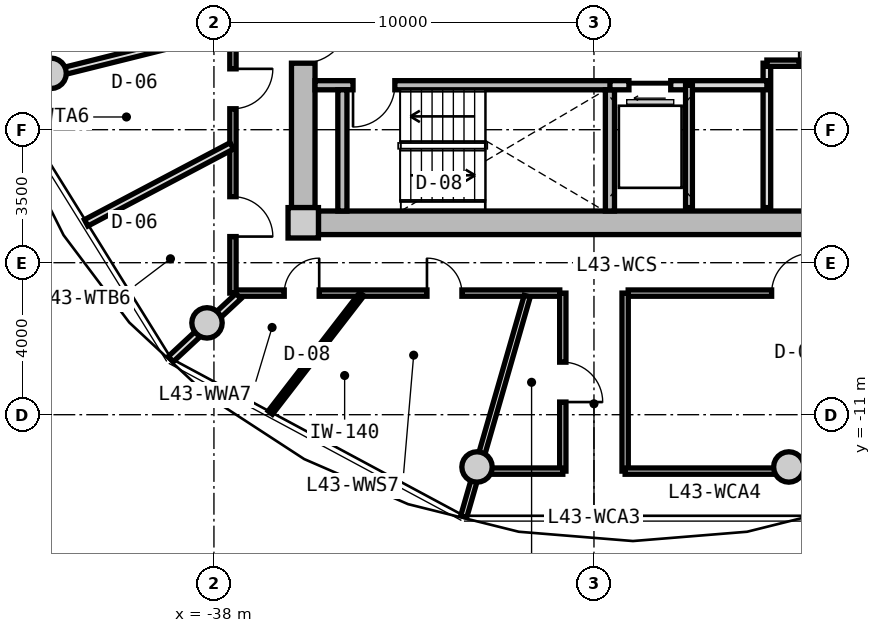
"""IFC4 building model, lengths in metres.
Left out: names, types, materials, properties, quantities, classifications, styles, units other than length and angle.
Written with IfcOpenShell. Run it as: python <this file> out.ifc"""

import sys

from ifc_helpers import new_model, si_unit, direction, frame, frame_2d, origin, origin_2d, place, context, subcontext, project, spatial, rectangle, circle, extrude, source, transform, mapped, element, fill, save


model = new_model("IFC4")
c1 = context("Model", 3, precision=1e-05, world=origin(), true_north=direction((0.0, 1.0)))
c2 = subcontext(c1, "Body", "Model", "MODEL_VIEW")
j1 = project(units=[si_unit("LENGTHUNIT", "METRE"), si_unit("PLANEANGLEUNIT", "RADIAN")], contexts=[c1])
p1 = place(None, origin())
s1 = spatial("IfcSite", under=j1, at=p1, CompositionType="ELEMENT")
p2 = place(p1, origin())
s2 = spatial("IfcBuilding", under=s1, at=p2, CompositionType="ELEMENT")
p3 = place(p2, frame((0.0, 0.0, 140.4)))
s3 = spatial("IfcBuildingStorey", under=s2, at=p3, CompositionType="ELEMENT", Elevation=140.4)
m1 = source(origin(), c2, "Body", "SweptSolid", [
    extrude(rectangle(XDim=0.8, YDim=0.8, at=origin_2d()), origin(), (0.0, 0.0, 1.0), 3.05),
])
p4 = place(p3, frame((-35.65, -5.95, 0.0), z_axis=(0.0, 0.0, 1.0), x_axis=(1.0, 0.0, 0.0)))
e1 = element("IfcColumn", 1, at=p4, inside=s3, PredefinedType="COLUMN", context=c2, shape_type="MappedRepresentation", body=[
    mapped(m1, transform((0.0, 0.0, 0.0), x_axis=(1.0, 0.0, 0.0), y_axis=(0.0, 1.0, 0.0), z_axis=(0.0, 0.0, 1.0), scale=1.0)),
])
m2 = source(origin(), c2, "Body", "SweptSolid", [
    extrude(rectangle(XDim=14.5, YDim=0.62, at=frame_2d((7.25, 0.0))), origin(), (0.0, 0.0, 1.0), 2.81),
])
p5 = place(p3, frame((-20.75, -5.95, 0.0), z_axis=(0.0, 0.0, 1.0), x_axis=(-1.0, 0.0, 0.0)))
e2 = element("IfcWall", 2, at=p5, inside=s3, PredefinedType="SHEAR", context=c2, shape_type="MappedRepresentation", body=[
    mapped(m2, transform((0.0, 0.0, 0.0), x_axis=(1.0, 0.0, 0.0), y_axis=(0.0, 1.0, 0.0), z_axis=(0.0, 0.0, 1.0), scale=1.0)),
])
m3 = source(origin(), c2, "Body", "SweptSolid", [
    extrude(rectangle(XDim=11.1, YDim=0.62, at=frame_2d((5.55, 0.0))), origin(), (0.0, 0.0, 1.0), 2.81),
])
p6 = place(p3, frame((-35.65, -5.55, 0.0), z_axis=(0.0, 0.0, 1.0), x_axis=(0.0, 1.0, 0.0)))
e3 = element("IfcWall", 3, at=p6, inside=s3, PredefinedType="SHEAR", context=c2, shape_type="MappedRepresentation", body=[
    mapped(m3, transform((0.0, 0.0, 0.0), x_axis=(1.0, 0.0, 0.0), y_axis=(0.0, 1.0, 0.0), z_axis=(0.0, 0.0, 1.0), scale=1.0)),
])
p7 = place(p6, frame((3.8, 0.0, 0.0)))
e4 = element("IfcOpeningElement", 4, at=p7, cuts=e3, PredefinedType="OPENING", context=c2, shape_type="SweptSolid", body=[
    extrude(rectangle(XDim=1.2, YDim=2.15, at=frame_2d((0.6, 1.075))), frame((0.0, 0.32, 0.0), z_axis=(0.0, -1.0, 0.0), x_axis=(1.0, 0.0, 0.0)), (0.0, 0.0, 1.0), 0.64),
])
m4 = source(origin(), c2, "Body", "SweptSolid", [
    extrude(circle(Radius=0.4, at=origin_2d()), origin(), (0.0, 0.0, 1.0), 3.05),
])
for number, where, z_axis, x_axis in (
    (5, (-42.285, -2.016, 0.0), (0.0, 0.0, 1.0), (1.0, 0.0, 0.0)),
    (6, (-38.183, -8.584, 0.0), (0.0, 0.0, 1.0), (1.0, 0.0, 0.0)),
    (7, (-31.077, -12.375, 0.0), (0.0, 0.0, 1.0), (1.0, 0.0, 0.0)),
    (8, (-22.873, -12.375, 0.0), (0.0, 0.0, 1.0), (1.0, 0.0, 0.0)),
):
    element("IfcColumn", number, at=place(p3, frame(where, z_axis=z_axis, x_axis=x_axis)), inside=s3, PredefinedType="COLUMN", context=c2, shape_type="MappedRepresentation", body=[
        mapped(m4, transform((0.0, 0.0, 0.0), x_axis=(1.0, 0.0, 0.0), y_axis=(0.0, 1.0, 0.0), z_axis=(0.0, 0.0, 1.0), scale=1.0)),
    ])
m5 = source(origin(), c2, "Body", "SweptSolid", [
    extrude(rectangle(XDim=7.88, YDim=0.24, at=frame_2d((3.94, 0.0))), origin(), (0.0, 0.0, 1.0), 2.81),
])
p8 = place(p3, frame((-35.34, -2.33, 0.0), z_axis=(0.0, 0.0, 1.0), x_axis=(1.0, 0.0, 0.0)))
e9 = element("IfcWall", 9, at=p8, inside=s3, PredefinedType="PARTITIONING", context=c2, shape_type="MappedRepresentation", body=[
    mapped(m5, transform((0.0, 0.0, 0.0), x_axis=(1.0, 0.0, 0.0), y_axis=(0.0, 1.0, 0.0), z_axis=(0.0, 0.0, 1.0), scale=1.0)),
])
p9 = place(p8, frame((1.0, 0.0, 0.0)))
e10 = element("IfcOpeningElement", 10, at=p9, cuts=e9, PredefinedType="OPENING", context=c2, shape_type="SweptSolid", body=[
    extrude(rectangle(XDim=1.1, YDim=2.15, at=frame_2d((0.55, 1.075))), frame((0.0, 0.13, 0.0), z_axis=(0.0, -1.0, 0.0), x_axis=(1.0, 0.0, 0.0)), (0.0, 0.0, 1.0), 0.26),
])
m6 = source(origin(), c2, "Body", "SweptSolid", [
    extrude(rectangle(XDim=3.19, YDim=0.24, at=frame_2d((1.595, 0.0))), origin(), (0.0, 0.0, 1.0), 2.81),
])
for number, where, z_axis, x_axis in (
    (11, (-34.62, -5.64, 0.0), (0.0, 0.0, 1.0), (0.0, 1.0, 0.0)),
    (12, (-27.58, -5.64, 0.0), (0.0, 0.0, 1.0), (0.0, 1.0, 0.0)),
):
    element("IfcWall", number, at=place(p3, frame(where, z_axis=z_axis, x_axis=x_axis)), inside=s3, PredefinedType="PARTITIONING", context=c2, shape_type="MappedRepresentation", body=[
        mapped(m6, transform((0.0, 0.0, 0.0), x_axis=(1.0, 0.0, 0.0), y_axis=(0.0, 1.0, 0.0), z_axis=(0.0, 0.0, 1.0), scale=1.0)),
    ])
m7 = source(origin(), c2, "Body", "SweptSolid", [
    extrude(rectangle(XDim=3.8, YDim=0.2, at=frame_2d((1.9, 0.0))), origin(), (0.0, 0.0, 1.0), 2.795),
])
p10 = place(p3, frame((-23.45, -5.55, 0.0), z_axis=(0.0, 0.0, 1.0), x_axis=(0.0, 1.0, 0.0)))
e13 = element("IfcWall", 13, at=p10, inside=s3, PredefinedType="PARTITIONING", context=c2, shape_type="MappedRepresentation", body=[
    mapped(m7, transform((0.0, 0.0, 0.0), x_axis=(1.0, 0.0, 0.0), y_axis=(0.0, 1.0, 0.0), z_axis=(0.0, 0.0, 1.0), scale=1.0)),
])
m8 = source(origin(), c2, "Body", "SweptSolid", [
    extrude(rectangle(XDim=4.13, YDim=0.24, at=frame_2d((2.065, 0.0))), origin(), (0.0, 0.0, 1.0), 2.795),
])
p11 = place(p3, frame((-27.58, -2.33, 0.0), z_axis=(0.0, 0.0, 1.0), x_axis=(1.0, 0.0, 0.0)))
e14 = element("IfcWall", 14, at=p11, inside=s3, PredefinedType="PARTITIONING", context=c2, shape_type="MappedRepresentation", body=[
    mapped(m8, transform((0.0, 0.0, 0.0), x_axis=(1.0, 0.0, 0.0), y_axis=(0.0, 1.0, 0.0), z_axis=(0.0, 0.0, 1.0), scale=1.0)),
])
p12 = place(p11, frame((0.5, 0.0, 0.0)))
e15 = element("IfcOpeningElement", 15, at=p12, cuts=e14, PredefinedType="OPENING", context=c2, shape_type="SweptSolid", body=[
    extrude(rectangle(XDim=1.1, YDim=2.2, at=frame_2d((0.55, 1.1))), frame((0.0, 0.13, 0.0), z_axis=(0.0, -1.0, 0.0), x_axis=(1.0, 0.0, 0.0)), (0.0, 0.0, 1.0), 0.26),
])
m9 = source(origin(), c2, "Body", "SweptSolid", [
    extrude(rectangle(XDim=3.22, YDim=0.18, at=frame_2d((1.61, 0.0))), origin(), (0.0, 0.0, 1.0), 2.795),
])
p13 = place(p3, frame((-25.5, -5.55, 0.0), z_axis=(0.0, 0.0, 1.0), x_axis=(0.0, 1.0, 0.0)))
e16 = element("IfcWall", 16, at=p13, inside=s3, PredefinedType="PARTITIONING", context=c2, shape_type="MappedRepresentation", body=[
    mapped(m9, transform((0.0, 0.0, 0.0), x_axis=(1.0, 0.0, 0.0), y_axis=(0.0, 1.0, 0.0), z_axis=(0.0, 0.0, 1.0), scale=1.0)),
])
m10 = source(origin(), c2, "Body", "SweptSolid", [
    extrude(rectangle(XDim=2.7, YDim=0.165, at=frame_2d((1.35, 0.0))), origin(), (0.0, 0.0, 1.0), 2.795),
])
p14 = place(p3, frame((-23.45, -1.75, 0.0), z_axis=(0.0, 0.0, 1.0), x_axis=(1.0, 0.0, 0.0)))
e17 = element("IfcWall", 17, at=p14, inside=s3, PredefinedType="PARTITIONING", context=c2, shape_type="MappedRepresentation", body=[
    mapped(m10, transform((0.0, 0.0, 0.0), x_axis=(1.0, 0.0, 0.0), y_axis=(0.0, 1.0, 0.0), z_axis=(0.0, 0.0, 1.0), scale=1.0)),
])
p15 = place(p14, frame((0.85, 0.0, 0.0)))
e18 = element("IfcOpeningElement", 18, at=p15, cuts=e17, PredefinedType="OPENING", context=c2, shape_type="SweptSolid", body=[
    extrude(rectangle(XDim=0.925, YDim=2.1, at=frame_2d((0.462, 1.05))), frame((0.0, 0.093, 0.0), z_axis=(0.0, -1.0, 0.0), x_axis=(1.0, 0.0, 0.0)), (0.0, 0.0, 1.0), 0.185),
])
m11 = source(origin(), c2, "Body", "SweptSolid", [
    extrude(rectangle(XDim=8.6, YDim=0.165, at=frame_2d((4.3, 0.0))), origin(), (0.0, 0.0, 1.0), 2.795),
])
p16 = place(p3, frame((-18.5, -7.8, 0.0), z_axis=(0.0, 0.0, 1.0), x_axis=(-1.0, 0.0, 0.0)))
e19 = element("IfcWall", 19, at=p16, inside=s3, PredefinedType="PARTITIONING", context=c2, shape_type="MappedRepresentation", body=[
    mapped(m11, transform((0.0, 0.0, 0.0), x_axis=(1.0, 0.0, 0.0), y_axis=(0.0, 1.0, 0.0), z_axis=(0.0, 0.0, 1.0), scale=1.0)),
])
p17 = place(p16, frame((3.775, 0.0, 0.0)))
e20 = element("IfcOpeningElement", 20, at=p17, cuts=e19, PredefinedType="OPENING", context=c2, shape_type="SweptSolid", body=[
    extrude(rectangle(XDim=1.05, YDim=2.15, at=frame_2d((0.525, 1.075))), frame((0.0, 0.093, 0.0), z_axis=(0.0, -1.0, 0.0), x_axis=(1.0, 0.0, 0.0)), (0.0, 0.0, 1.0), 0.185),
])
p18 = place(p3, frame((-28.9, -7.8, 0.0), z_axis=(0.0, 0.0, 1.0), x_axis=(-1.0, 0.0, 0.0)))
e21 = element("IfcWall", 21, at=p18, inside=s3, PredefinedType="PARTITIONING", context=c2, shape_type="MappedRepresentation", body=[
    mapped(m11, transform((0.0, 0.0, 0.0), x_axis=(1.0, 0.0, 0.0), y_axis=(0.0, 1.0, 0.0), z_axis=(0.0, 0.0, 1.0), scale=1.0)),
])
p19 = place(p18, frame((6.33, 0.0, 0.0)))
e22 = element("IfcOpeningElement", 22, at=p19, cuts=e21, PredefinedType="OPENING", context=c2, shape_type="SweptSolid", body=[
    extrude(rectangle(XDim=0.92, YDim=2.1, at=frame_2d((0.46, 1.05))), frame((0.0, 0.093, 0.0), z_axis=(0.0, -1.0, 0.0), x_axis=(1.0, 0.0, 0.0)), (0.0, 0.0, 1.0), 0.185),
])
p20 = place(p18, frame((2.575, 0.0, 0.0)))
e23 = element("IfcOpeningElement", 23, at=p20, cuts=e21, PredefinedType="OPENING", context=c2, shape_type="SweptSolid", body=[
    extrude(rectangle(XDim=0.92, YDim=2.1, at=frame_2d((0.46, 1.05))), frame((0.0, 0.093, 0.0), z_axis=(0.0, -1.0, 0.0), x_axis=(1.0, 0.0, 0.0)), (0.0, 0.0, 1.0), 0.185),
])
m12 = source(origin(), c2, "Body", "SweptSolid", [
    extrude(rectangle(XDim=15.6, YDim=0.165, at=frame_2d((7.8, 0.0))), origin(), (0.0, 0.0, 1.0), 2.795),
])
p21 = place(p3, frame((-37.5, -7.8, 0.0), z_axis=(0.0, 0.0, 1.0), x_axis=(0.0, 1.0, 0.0)))
e24 = element("IfcWall", 24, at=p21, inside=s3, PredefinedType="PARTITIONING", context=c2, shape_type="MappedRepresentation", body=[
    mapped(m12, transform((0.0, 0.0, 0.0), x_axis=(1.0, 0.0, 0.0), y_axis=(0.0, 1.0, 0.0), z_axis=(0.0, 0.0, 1.0), scale=1.0)),
])
p22 = place(p21, frame((8.95, 0.0, 0.0)))
e25 = element("IfcOpeningElement", 25, at=p22, cuts=e24, PredefinedType="OPENING", context=c2, shape_type="SweptSolid", body=[
    extrude(rectangle(XDim=1.25, YDim=2.2, at=frame_2d((0.625, 1.1))), frame((0.0, 0.093, 0.0), z_axis=(0.0, -1.0, 0.0), x_axis=(1.0, 0.0, 0.0)), (0.0, 0.0, 1.0), 0.185),
])
p23 = place(p21, frame((4.851, 0.0, 0.0)))
e26 = element("IfcOpeningElement", 26, at=p23, cuts=e24, PredefinedType="OPENING", context=c2, shape_type="SweptSolid", body=[
    extrude(rectangle(XDim=1.05, YDim=2.15, at=frame_2d((0.525, 1.075))), frame((0.0, 0.093, 0.0), z_axis=(0.0, -1.0, 0.0), x_axis=(1.0, 0.0, 0.0)), (0.0, 0.0, 1.0), 0.185),
])
p24 = place(p21, frame((1.488, 0.0, 0.0)))
e27 = element("IfcOpeningElement", 27, at=p24, cuts=e24, PredefinedType="OPENING", context=c2, shape_type="SweptSolid", body=[
    extrude(rectangle(XDim=1.05, YDim=2.15, at=frame_2d((0.525, 1.075))), frame((0.0, 0.093, 0.0), z_axis=(0.0, -1.0, 0.0), x_axis=(1.0, 0.0, 0.0)), (0.0, 0.0, 1.0), 0.185),
])
m13 = source(origin(), c2, "Body", "SweptSolid", [
    extrude(rectangle(XDim=6.035, YDim=0.165, at=frame_2d((3.018, 0.0))), origin(), (0.0, 0.0, 1.0), 2.345),
])
p25 = place(p3, frame((-29.756, -7.88, 0.0), z_axis=(0.0, 0.0, 1.0), x_axis=(-0.276809454862, -0.960924828329, 0.0)))
e28 = element("IfcWall", 28, at=p25, inside=s3, PredefinedType="PARTITIONING", context=c2, shape_type="MappedRepresentation", body=[
    mapped(m13, transform((0.0, 0.0, 0.0), x_axis=(1.0, 0.0, 0.0), y_axis=(0.0, 1.0, 0.0), z_axis=(0.0, 0.0, 1.0), scale=1.0)),
])
m14 = source(origin(), c2, "Body", "SweptSolid", [
    extrude(rectangle(XDim=4.685, YDim=0.165, at=frame_2d((2.342, 0.0))), origin(), (0.0, 0.0, 1.0), 2.795),
])
p26 = place(p3, frame((-28.82, -12.485, 0.0), z_axis=(0.0, 0.0, 1.0), x_axis=(0.0, 1.0, 0.0)))
e29 = element("IfcWall", 29, at=p26, inside=s3, PredefinedType="PARTITIONING", context=c2, shape_type="MappedRepresentation", body=[
    mapped(m14, transform((0.0, 0.0, 0.0), x_axis=(1.0, 0.0, 0.0), y_axis=(0.0, 1.0, 0.0), z_axis=(0.0, 0.0, 1.0), scale=1.0)),
])
p27 = place(p26, frame((1.817, 0.0, 0.0)))
e30 = element("IfcOpeningElement", 30, at=p27, cuts=e29, PredefinedType="OPENING", context=c2, shape_type="SweptSolid", body=[
    extrude(rectangle(XDim=1.05, YDim=2.15, at=frame_2d((0.525, 1.075))), frame((0.0, 0.093, 0.0), z_axis=(0.0, -1.0, 0.0), x_axis=(1.0, 0.0, 0.0)), (0.0, 0.0, 1.0), 0.185),
])
m15 = source(origin(), c2, "Body", "SweptSolid", [
    extrude(rectangle(XDim=2.419, YDim=0.165, at=frame_2d((1.209, 0.0))), origin(), (0.0, 0.0, 1.0), 2.345),
])
p28 = place(p3, frame((-31.239, -12.485, 0.0), z_axis=(0.0, 0.0, 1.0), x_axis=(1.0, 0.0, 0.0)))
e31 = element("IfcWall", 31, at=p28, inside=s3, PredefinedType="PARTITIONING", context=c2, shape_type="MappedRepresentation", body=[
    mapped(m15, transform((0.0, 0.0, 0.0), x_axis=(1.0, 0.0, 0.0), y_axis=(0.0, 1.0, 0.0), z_axis=(0.0, 0.0, 1.0), scale=1.0)),
])
p29 = place(p3, frame((-27.18, -12.485, 0.0), z_axis=(0.0, 0.0, 1.0), x_axis=(0.0, 1.0, 0.0)))
e32 = element("IfcWall", 32, at=p29, inside=s3, PredefinedType="PARTITIONING", context=c2, shape_type="MappedRepresentation", body=[
    mapped(m14, transform((0.0, 0.0, 0.0), x_axis=(1.0, 0.0, 0.0), y_axis=(0.0, 1.0, 0.0), z_axis=(0.0, 0.0, 1.0), scale=1.0)),
])
m16 = source(origin(), c2, "Body", "SweptSolid", [
    extrude(rectangle(XDim=7.139, YDim=0.165, at=frame_2d((3.569, 0.0))), origin(), (0.0, 0.0, 1.0), 2.345),
])
p30 = place(p3, frame((-27.18, -12.485, 0.0), z_axis=(0.0, 0.0, 1.0), x_axis=(1.0, 0.0, 0.0)))
e33 = element("IfcWall", 33, at=p30, inside=s3, PredefinedType="PARTITIONING", context=c2, shape_type="MappedRepresentation", body=[
    mapped(m16, transform((0.0, 0.0, 0.0), x_axis=(1.0, 0.0, 0.0), y_axis=(0.0, 1.0, 0.0), z_axis=(0.0, 0.0, 1.0), scale=1.0)),
])
m17 = source(origin(), c2, "Body", "SweptSolid", [
    extrude(rectangle(XDim=6.193, YDim=0.19, at=frame_2d((3.096, 0.0))), origin(), (0.0, 0.0, 1.0), 2.345),
])
p31 = place(p3, frame((-37.58, -0.868, 0.0), z_axis=(0.0, 0.0, 1.0), x_axis=(-0.970309243466, -0.241867674657, 0.0)))
e34 = element("IfcWall", 34, at=p31, inside=s3, PredefinedType="PARTITIONING", context=c2, shape_type="MappedRepresentation", body=[
    mapped(m17, transform((0.0, 0.0, 0.0), x_axis=(1.0, 0.0, 0.0), y_axis=(0.0, 1.0, 0.0), z_axis=(0.0, 0.0, 1.0), scale=1.0)),
])
m18 = source(origin(), c2, "Body", "SweptSolid", [
    extrude(rectangle(XDim=2.435, YDim=0.19, at=frame_2d((1.217, 0.0))), origin(), (0.0, 0.0, 1.0), 2.345),
])
p32 = place(p3, frame((-37.354, -7.88, 0.0), z_axis=(0.0, 0.0, 1.0), x_axis=(-0.732164643118, -0.681127693878, 0.0)))
e35 = element("IfcWall", 35, at=p32, inside=s3, PredefinedType="PARTITIONING", context=c2, shape_type="MappedRepresentation", body=[
    mapped(m18, transform((0.0, 0.0, 0.0), x_axis=(1.0, 0.0, 0.0), y_axis=(0.0, 1.0, 0.0), z_axis=(0.0, 0.0, 1.0), scale=1.0)),
])
m19 = source(origin(), c2, "Body", "SweptSolid", [
    extrude(rectangle(XDim=4.335, YDim=0.19, at=frame_2d((2.168, 0.0))), origin(), (0.0, 0.0, 1.0), 2.795),
])
p33 = place(p3, frame((-37.53, -3.926, 0.0), z_axis=(0.0, 0.0, 1.0), x_axis=(-0.884108234352, -0.4672821738, 0.0)))
e36 = element("IfcWall", 36, at=p33, inside=s3, PredefinedType="PARTITIONING", context=c2, shape_type="MappedRepresentation", body=[
    mapped(m19, transform((0.0, 0.0, 0.0), x_axis=(1.0, 0.0, 0.0), y_axis=(0.0, 1.0, 0.0), z_axis=(0.0, 0.0, 1.0), scale=1.0)),
])
m20 = source(origin(), c2, "Body", "SweptSolid", [
    extrude(rectangle(XDim=3.937, YDim=0.14, at=frame_2d((1.968, 0.0))), origin(), (0.0, 0.0, 1.0), 2.795),
])
p34 = place(p3, frame((-34.11, -7.83, 0.0), z_axis=(0.0, 0.0, 1.0), x_axis=(-0.611016723561, -0.791617687731, 0.0)))
e37 = element("IfcWall", 37, at=p34, inside=s3, PredefinedType="PARTITIONING", context=c2, shape_type="MappedRepresentation", body=[
    mapped(m20, transform((0.0, 0.0, 0.0), x_axis=(1.0, 0.0, 0.0), y_axis=(0.0, 1.0, 0.0), z_axis=(0.0, 0.0, 1.0), scale=1.0)),
])
m21 = source(origin(), c2, "Body", "SweptSolid", [
    extrude(rectangle(XDim=1.1, YDim=2.15, at=frame_2d((0.55, 1.075))), frame((0.0, 0.025, 0.0), z_axis=(0.0, -1.0, 0.0), x_axis=(1.0, 0.0, 0.0)), (0.0, 0.0, 1.0), 0.05),
])
p35 = place(p9, frame((1.1, 0.0, 0.0), z_axis=(0.0, 0.0, 1.0), x_axis=(-1.0, 0.0, 0.0)))
e38 = element("IfcDoor", 38, at=p35, inside=s3, OperationType="SINGLE_SWING_RIGHT", PredefinedType="DOOR", context=c2, shape_type="MappedRepresentation", body=[
    mapped(m21, transform((0.0, 0.0, 0.0), x_axis=(1.0, 0.0, 0.0), y_axis=(0.0, 1.0, 0.0), z_axis=(0.0, 0.0, 1.0), scale=1.0)),
])
fill(e10, e38)
m22 = source(origin(), c2, "Body", "SweptSolid", [
    extrude(rectangle(XDim=1.2, YDim=2.15, at=frame_2d((0.6, 1.075))), frame((0.0, 0.025, 0.0), z_axis=(0.0, -1.0, 0.0), x_axis=(1.0, 0.0, 0.0)), (0.0, 0.0, 1.0), 0.05),
])
p36 = place(p7, frame((1.2, 0.0, 0.0), z_axis=(0.0, 0.0, 1.0), x_axis=(-1.0, 0.0, 0.0)))
e39 = element("IfcDoor", 39, at=p36, inside=s3, OperationType="SINGLE_SWING_LEFT", PredefinedType="DOOR", context=c2, shape_type="MappedRepresentation", body=[
    mapped(m22, transform((0.0, 0.0, 0.0), x_axis=(1.0, 0.0, 0.0), y_axis=(0.0, 1.0, 0.0), z_axis=(0.0, 0.0, 1.0), scale=1.0)),
])
fill(e4, e39)
m23 = source(origin(), c2, "Body", "SweptSolid", [
    extrude(rectangle(XDim=1.1, YDim=2.2, at=frame_2d((0.55, 1.1))), frame((0.0, 0.025, 0.0), z_axis=(0.0, -1.0, 0.0), x_axis=(1.0, 0.0, 0.0)), (0.0, 0.0, 1.0), 0.05),
])
p37 = place(p12, frame((1.1, 0.0, 0.0), z_axis=(0.0, 0.0, 1.0), x_axis=(-1.0, 0.0, 0.0)))
e40 = element("IfcDoor", 40, at=p37, inside=s3, OperationType="SLIDING_TO_LEFT", PredefinedType="DOOR", context=c2, shape_type="MappedRepresentation", body=[
    mapped(m23, transform((0.0, 0.0, 0.0), x_axis=(1.0, 0.0, 0.0), y_axis=(0.0, 1.0, 0.0), z_axis=(0.0, 0.0, 1.0), scale=1.0)),
])
fill(e15, e40)
m24 = source(origin(), c2, "Body", "SweptSolid", [
    extrude(rectangle(XDim=0.925, YDim=2.1, at=frame_2d((0.462, 1.05))), frame((0.0, 0.025, 0.0), z_axis=(0.0, -1.0, 0.0), x_axis=(1.0, 0.0, 0.0)), (0.0, 0.0, 1.0), 0.05),
])
p38 = place(p15, origin())
e41 = element("IfcDoor", 41, at=p38, inside=s3, OperationType="SINGLE_SWING_LEFT", PredefinedType="DOOR", context=c2, shape_type="MappedRepresentation", body=[
    mapped(m24, transform((0.0, 0.0, 0.0), x_axis=(1.0, 0.0, 0.0), y_axis=(0.0, 1.0, 0.0), z_axis=(0.0, 0.0, 1.0), scale=1.0)),
])
fill(e18, e41)
m25 = source(origin(), c2, "Body", "SweptSolid", [
    extrude(rectangle(XDim=1.05, YDim=2.15, at=frame_2d((0.525, 1.075))), frame((0.0, 0.025, 0.0), z_axis=(0.0, -1.0, 0.0), x_axis=(1.0, 0.0, 0.0)), (0.0, 0.0, 1.0), 0.05),
])
p39 = place(p27, frame((1.05, 0.0, 0.0), z_axis=(0.0, 0.0, 1.0), x_axis=(-1.0, 0.0, 0.0)))
e42 = element("IfcDoor", 42, at=p39, inside=s3, OperationType="SINGLE_SWING_RIGHT", PredefinedType="DOOR", context=c2, shape_type="MappedRepresentation", body=[
    mapped(m25, transform((0.0, 0.0, 0.0), x_axis=(1.0, 0.0, 0.0), y_axis=(0.0, 1.0, 0.0), z_axis=(0.0, 0.0, 1.0), scale=1.0)),
])
fill(e30, e42)
p40 = place(p17, frame((1.05, 0.0, 0.0), z_axis=(0.0, 0.0, 1.0), x_axis=(-1.0, 0.0, 0.0)))
e43 = element("IfcDoor", 43, at=p40, inside=s3, OperationType="SINGLE_SWING_RIGHT", PredefinedType="DOOR", context=c2, shape_type="MappedRepresentation", body=[
    mapped(m25, transform((0.0, 0.0, 0.0), x_axis=(1.0, 0.0, 0.0), y_axis=(0.0, 1.0, 0.0), z_axis=(0.0, 0.0, 1.0), scale=1.0)),
])
fill(e20, e43)
p41 = place(p23, frame((1.05, 0.0, 0.0), z_axis=(0.0, 0.0, 1.0), x_axis=(-1.0, 0.0, 0.0)))
e44 = element("IfcDoor", 44, at=p41, inside=s3, OperationType="SINGLE_SWING_LEFT", PredefinedType="DOOR", context=c2, shape_type="MappedRepresentation", body=[
    mapped(m25, transform((0.0, 0.0, 0.0), x_axis=(1.0, 0.0, 0.0), y_axis=(0.0, 1.0, 0.0), z_axis=(0.0, 0.0, 1.0), scale=1.0)),
])
fill(e26, e44)
p42 = place(p24, frame((1.05, 0.0, 0.0), z_axis=(0.0, 0.0, 1.0), x_axis=(-1.0, 0.0, 0.0)))
e45 = element("IfcDoor", 45, at=p42, inside=s3, OperationType="SINGLE_SWING_RIGHT", PredefinedType="DOOR", context=c2, shape_type="MappedRepresentation", body=[
    mapped(m25, transform((0.0, 0.0, 0.0), x_axis=(1.0, 0.0, 0.0), y_axis=(0.0, 1.0, 0.0), z_axis=(0.0, 0.0, 1.0), scale=1.0)),
])
fill(e27, e45)
m26 = source(origin(), c2, "Body", "SweptSolid", [
    extrude(rectangle(XDim=0.92, YDim=2.1, at=frame_2d((0.46, 1.05))), frame((0.0, 0.025, 0.0), z_axis=(0.0, -1.0, 0.0), x_axis=(1.0, 0.0, 0.0)), (0.0, 0.0, 1.0), 0.05),
])
p43 = place(p19, frame((0.92, 0.0, 0.0), z_axis=(0.0, 0.0, 1.0), x_axis=(-1.0, 0.0, 0.0)))
e46 = element("IfcDoor", 46, at=p43, inside=s3, OperationType="SINGLE_SWING_RIGHT", PredefinedType="DOOR", context=c2, shape_type="MappedRepresentation", body=[
    mapped(m26, transform((0.0, 0.0, 0.0), x_axis=(1.0, 0.0, 0.0), y_axis=(0.0, 1.0, 0.0), z_axis=(0.0, 0.0, 1.0), scale=1.0)),
])
fill(e22, e46)
p44 = place(p20, frame((0.92, 0.0, 0.0), z_axis=(0.0, 0.0, 1.0), x_axis=(-1.0, 0.0, 0.0)))
e47 = element("IfcDoor", 47, at=p44, inside=s3, OperationType="SINGLE_SWING_LEFT", PredefinedType="DOOR", context=c2, shape_type="MappedRepresentation", body=[
    mapped(m26, transform((0.0, 0.0, 0.0), x_axis=(1.0, 0.0, 0.0), y_axis=(0.0, 1.0, 0.0), z_axis=(0.0, 0.0, 1.0), scale=1.0)),
])
fill(e23, e47)
save(model, sys.argv[1])
